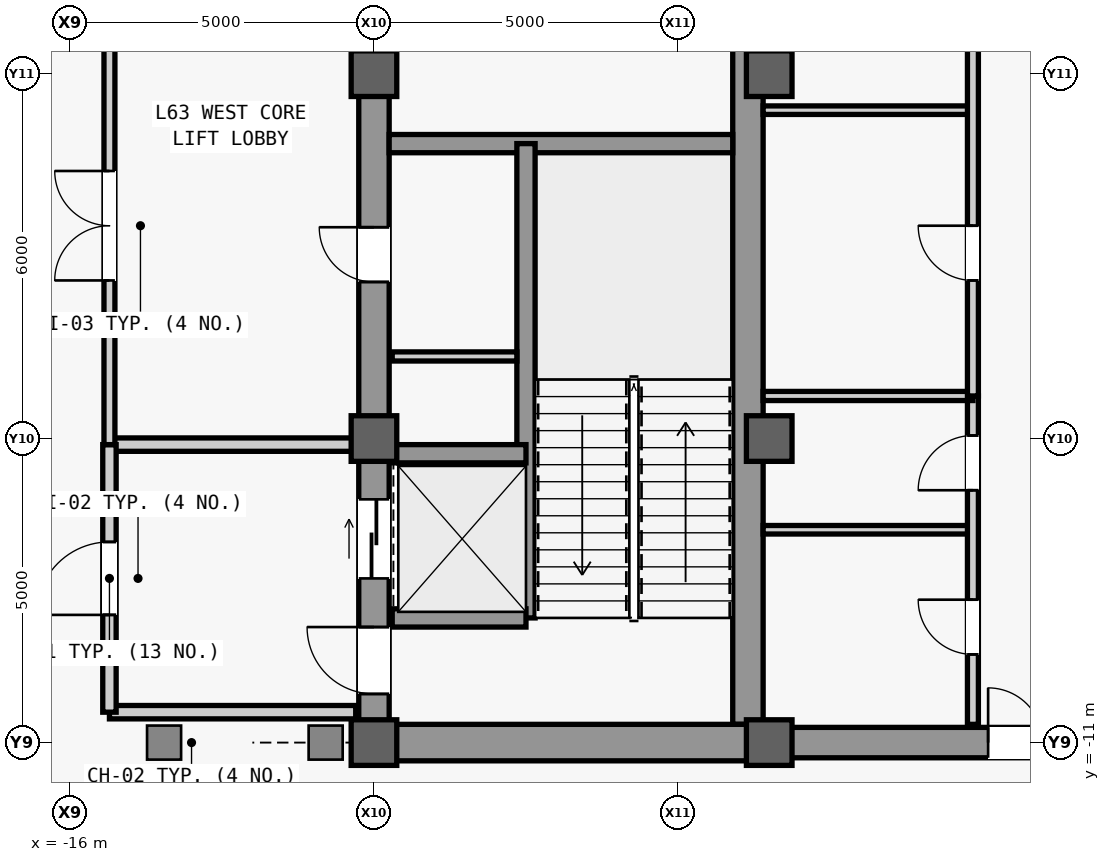
"""IFC4 building model, lengths in metres.
Left out: names, types, materials, properties, quantities, classifications, styles, units other than length and angle.
Written with IfcOpenShell. Run it as: python <this file> out.ifc"""

import sys

from ifc_helpers import new_model, si_unit, direction, frame, frame_2d, origin, origin_2d, place, context, subcontext, project, spatial, rectangle, extrude, source, transform, mapped, element, fill, save


model = new_model("IFC4")
c1 = context("Model", 3, precision=1e-05, world=origin(), true_north=direction((0.0, 1.0)))
c2 = subcontext(c1, "Body", "Model", "MODEL_VIEW")
j1 = project(units=[si_unit("LENGTHUNIT", "METRE"), si_unit("PLANEANGLEUNIT", "RADIAN")], contexts=[c1])
p1 = place(None, origin())
s1 = spatial("IfcSite", under=j1, at=p1, CompositionType="ELEMENT")
p2 = place(p1, origin())
s2 = spatial("IfcBuilding", under=s1, at=p2, CompositionType="ELEMENT")
p3 = place(p2, frame((0.0, 0.0, 268.3)))
s3 = spatial("IfcBuildingStorey", under=s2, at=p3, CompositionType="ELEMENT", Elevation=268.3)
m1 = source(origin(), c2, "Body", "SweptSolid", [
    extrude(rectangle(XDim=22.0, YDim=0.5, at=frame_2d((11.0, 0.0))), origin(), (0.0, 0.0, 1.0), 4.98),
])
p4 = place(p3, frame((-11.0, -11.0, 0.0), z_axis=(0.0, 0.0, 1.0), x_axis=(0.0, 1.0, 0.0)))
e1 = element("IfcWall", 1, at=p4, inside=s3, PredefinedType="SHEAR", context=c2, shape_type="MappedRepresentation", body=[
    mapped(m1, transform((0.0, 0.0, 0.0), scale=1.0)),
])
m2 = source(origin(), c2, "Body", "SweptSolid", [
    extrude(rectangle(XDim=1.1, YDim=2.2, at=frame_2d((0.55, 1.1))), frame((0.0, 0.26, 0.0), z_axis=(0.0, -1.0, 0.0), x_axis=(1.0, 0.0, 0.0)), (0.0, 0.0, 1.0), 0.52),
])
p5 = place(p4, frame((0.8, 0.0, 0.0)))
e2 = element("IfcOpeningElement", 2, at=p5, cuts=e1, PredefinedType="OPENING", context=c2, shape_type="MappedRepresentation", body=[
    mapped(m2, transform((0.0, 0.0, 0.0), scale=1.0)),
])
p6 = place(p4, frame((12.5, 0.0, 0.0)))
e3 = element("IfcOpeningElement", 3, at=p6, cuts=e1, PredefinedType="OPENING", context=c2, shape_type="MappedRepresentation", body=[
    mapped(m2, transform((0.0, 0.0, 0.0), scale=1.0)),
])
m3 = source(origin(), c2, "Body", "SweptSolid", [
    extrude(rectangle(XDim=0.9, YDim=2.15, at=frame_2d((0.45, 1.075))), frame((0.0, 0.26, 0.0), z_axis=(0.0, -1.0, 0.0), x_axis=(1.0, 0.0, 0.0)), (0.0, 0.0, 1.0), 0.52),
])
p7 = place(p4, frame((7.575, 0.0, 0.0)))
e4 = element("IfcOpeningElement", 4, at=p7, cuts=e1, PredefinedType="OPENING", context=c2, shape_type="MappedRepresentation", body=[
    mapped(m3, transform((0.0, 0.0, 0.0), scale=1.0)),
])
m4 = source(origin(), c2, "Body", "SweptSolid", [
    extrude(rectangle(XDim=1.3, YDim=2.3, at=frame_2d((0.65, 1.15))), frame((0.0, 0.26, 0.0), z_axis=(0.0, -1.0, 0.0), x_axis=(1.0, 0.0, 0.0)), (0.0, 0.0, 1.0), 0.52),
])
p8 = place(p4, frame((2.7, 0.0, 0.0)))
e5 = element("IfcOpeningElement", 5, at=p8, cuts=e1, PredefinedType="OPENING", context=c2, shape_type="MappedRepresentation", body=[
    mapped(m4, transform((0.0, 0.0, 0.0), scale=1.0)),
])
m5 = source(origin(), c2, "Body", "SweptSolid", [
    extrude(rectangle(XDim=21.4, YDim=0.5, at=frame_2d((10.7, 0.0))), origin(), (0.0, 0.0, 1.0), 4.98),
])
p9 = place(p3, frame((-4.85, -10.7, 0.0), z_axis=(0.0, 0.0, 1.0), x_axis=(0.0, 1.0, 0.0)))
e6 = element("IfcWall", 6, at=p9, inside=s3, PredefinedType="SHEAR", context=c2, shape_type="MappedRepresentation", body=[
    mapped(m5, transform((0.0, 0.0, 0.0), scale=1.0)),
])
m6 = source(origin(), c2, "Body", "SweptSolid", [
    extrude(rectangle(XDim=5.9, YDim=0.6, at=frame_2d((2.95, 0.0))), origin(), (0.0, 0.0, 1.0), 4.98),
])
p10 = place(p3, frame((-10.75, -11.0, 0.0), z_axis=(0.0, 0.0, 1.0), x_axis=(1.0, 0.0, 0.0)))
e7 = element("IfcWall", 7, at=p10, inside=s3, PredefinedType="SHEAR", context=c2, shape_type="MappedRepresentation", body=[
    mapped(m6, transform((0.0, 0.0, 0.0), scale=1.0)),
])
m7 = source(origin(), c2, "Body", "SweptSolid", [
    extrude(rectangle(XDim=5.65, YDim=0.3, at=frame_2d((2.825, 0.0))), origin(), (0.0, 0.0, 1.0), 4.98),
])
p11 = place(p3, frame((-10.75, -1.15, 0.0), z_axis=(0.0, 0.0, 1.0), x_axis=(1.0, 0.0, 0.0)))
e8 = element("IfcWall", 8, at=p11, inside=s3, PredefinedType="SHEAR", context=c2, shape_type="MappedRepresentation", body=[
    mapped(m7, transform((0.0, 0.0, 0.0), scale=1.0)),
])
m8 = source(origin(), c2, "Body", "SweptSolid", [
    extrude(rectangle(XDim=9.2, YDim=0.5, at=frame_2d((4.6, 0.0))), origin(), (0.0, 0.0, 1.0), 4.98),
])
p12 = place(p3, frame((-4.6, -11.0, 0.0), z_axis=(0.0, 0.0, 1.0), x_axis=(1.0, 0.0, 0.0)))
e9 = element("IfcWall", 9, at=p12, inside=s3, PredefinedType="SHEAR", context=c2, shape_type="MappedRepresentation", body=[
    mapped(m8, transform((0.0, 0.0, 0.0), scale=1.0)),
])
m9 = source(origin(), c2, "Body", "SweptSolid", [
    extrude(rectangle(XDim=1.8, YDim=2.25, at=frame_2d((0.9, 1.125))), frame((0.0, 0.26, 0.0), z_axis=(0.0, -1.0, 0.0), x_axis=(1.0, 0.0, 0.0)), (0.0, 0.0, 1.0), 0.52),
])
p13 = place(p12, frame((3.7, 0.0, 0.0)))
e10 = element("IfcOpeningElement", 10, at=p13, cuts=e9, PredefinedType="OPENING", context=c2, shape_type="MappedRepresentation", body=[
    mapped(m9, transform((0.0, 0.0, 0.0), scale=1.0)),
])
m10 = source(origin(), c2, "Body", "SweptSolid", [
    extrude(rectangle(XDim=0.75, YDim=0.75, at=origin_2d()), origin(), (0.0, 0.0, 1.0), 5.2),
])
for number, where, z_axis, x_axis in (
    (11, (-11.0, -11.0, 0.0), (0.0, 0.0, 1.0), (1.0, 0.0, 0.0)),
    (12, (-11.0, -6.0, 0.0), (0.0, 0.0, 1.0), (1.0, 0.0, 0.0)),
    (13, (-11.0, 0.0, 0.0), (0.0, 0.0, 1.0), (1.0, 0.0, 0.0)),
    (14, (-4.5, -11.0, 0.0), (0.0, 0.0, 1.0), (1.0, 0.0, 0.0)),
    (15, (-4.5, -6.0, 0.0), (0.0, 0.0, 1.0), (1.0, 0.0, 0.0)),
    (16, (-4.5, 0.0, 0.0), (0.0, 0.0, 1.0), (1.0, 0.0, 0.0)),
):
    element("IfcColumn", number, at=place(p3, frame(where, z_axis=z_axis, x_axis=x_axis)), inside=s3, PredefinedType="COLUMN", context=c2, shape_type="MappedRepresentation", body=[
        mapped(m10, transform((0.0, 0.0, 0.0), scale=1.0)),
    ])
m11 = source(origin(), c2, "Body", "SweptSolid", [
    extrude(rectangle(XDim=7.8, YDim=0.3, at=frame_2d((3.9, 0.0))), origin(), (0.0, 0.0, 1.0), 4.98),
])
p14 = place(p3, frame((-8.5, -8.95, 0.0), z_axis=(0.0, 0.0, 1.0), x_axis=(0.0, 1.0, 0.0)))
e17 = element("IfcWall", 17, at=p14, inside=s3, PredefinedType="SHEAR", context=c2, shape_type="MappedRepresentation", body=[
    mapped(m11, transform((0.0, 0.0, 0.0), scale=1.0)),
])
m12 = source(origin(), c2, "Body", "SweptSolid", [
    extrude(rectangle(XDim=2.2, YDim=0.3, at=frame_2d((1.1, 0.0))), origin(), (0.0, 0.0, 1.0), 4.98),
])
for number, where, z_axis, x_axis in (
    (18, (-10.7, -8.95, 0.0), (0.0, 0.0, 1.0), (1.0, 0.0, 0.0)),
    (19, (-10.7, -6.25, 0.0), (0.0, 0.0, 1.0), (1.0, 0.0, 0.0)),
):
    element("IfcWall", number, at=place(p3, frame(where, z_axis=z_axis, x_axis=x_axis)), inside=s3, PredefinedType="SHEAR", context=c2, shape_type="MappedRepresentation", body=[
        mapped(m12, transform((0.0, 0.0, 0.0), scale=1.0)),
    ])
m13 = source(origin(), c2, "Body", "SweptSolid", [
    extrude(rectangle(XDim=2.05, YDim=0.15, at=frame_2d((1.025, 0.0))), origin(), (0.0, 0.0, 1.0), 4.98),
])
p15 = place(p3, frame((-10.7, -4.65, 0.0), z_axis=(0.0, 0.0, 1.0), x_axis=(1.0, 0.0, 0.0)))
e20 = element("IfcWall", 20, at=p15, inside=s3, PredefinedType="PARTITIONING", context=c2, shape_type="MappedRepresentation", body=[
    mapped(m13, transform((0.0, 0.0, 0.0), scale=1.0)),
])
m14 = source(origin(), c2, "Body", "SweptSolid", [
    extrude(rectangle(XDim=4.05, YDim=0.22, at=frame_2d((2.025, 0.0))), origin(), (0.0, 0.0, 1.0), 4.98),
])
p16 = place(p3, frame((-15.35, -10.5, 0.0), z_axis=(0.0, 0.0, 1.0), x_axis=(1.0, 0.0, 0.0)))
e21 = element("IfcWall", 21, at=p16, inside=s3, PredefinedType="PARTITIONING", context=c2, shape_type="MappedRepresentation", body=[
    mapped(m14, transform((0.0, 0.0, 0.0), scale=1.0)),
])
m15 = source(origin(), c2, "Body", "SweptSolid", [
    extrude(rectangle(XDim=4.05, YDim=0.22, at=frame_2d((2.025, 0.0))), origin(), (0.0, 0.0, 1.0), 4.285),
])
p17 = place(p3, frame((-15.35, -6.1, 0.0), z_axis=(0.0, 0.0, 1.0), x_axis=(1.0, 0.0, 0.0)))
e22 = element("IfcWall", 22, at=p17, inside=s3, PredefinedType="PARTITIONING", context=c2, shape_type="MappedRepresentation", body=[
    mapped(m15, transform((0.0, 0.0, 0.0), scale=1.0)),
])
m16 = source(origin(), c2, "Body", "SweptSolid", [
    extrude(rectangle(XDim=4.4, YDim=0.22, at=frame_2d((2.2, 0.0))), origin(), (0.0, 0.0, 1.0), 4.98),
])
p18 = place(p3, frame((-15.35, -10.5, 0.0), z_axis=(0.0, 0.0, 1.0), x_axis=(0.0, 1.0, 0.0)))
e23 = element("IfcWall", 23, at=p18, inside=s3, PredefinedType="PARTITIONING", context=c2, shape_type="MappedRepresentation", body=[
    mapped(m16, transform((0.0, 0.0, 0.0), scale=1.0)),
])
m17 = source(origin(), c2, "Body", "SweptSolid", [
    extrude(rectangle(XDim=1.2, YDim=2.2, at=frame_2d((0.6, 1.1))), frame((0.0, 0.12, 0.0), z_axis=(0.0, -1.0, 0.0), x_axis=(1.0, 0.0, 0.0)), (0.0, 0.0, 1.0), 0.24),
])
p19 = place(p18, frame((1.6, 0.0, 0.0)))
e24 = element("IfcOpeningElement", 24, at=p19, cuts=e23, PredefinedType="OPENING", context=c2, shape_type="MappedRepresentation", body=[
    mapped(m17, transform((0.0, 0.0, 0.0), scale=1.0)),
])
m18 = source(origin(), c2, "Body", "SweptSolid", [
    extrude(rectangle(XDim=16.6, YDim=0.18, at=frame_2d((8.3, 0.0))), origin(), (0.0, 0.0, 1.0), 4.98),
])
p20 = place(p3, frame((-15.35, -6.1, 0.0), z_axis=(0.0, 0.0, 1.0), x_axis=(0.0, 1.0, 0.0)))
e25 = element("IfcWall", 25, at=p20, inside=s3, PredefinedType="PARTITIONING", context=c2, shape_type="MappedRepresentation", body=[
    mapped(m18, transform((0.0, 0.0, 0.0), scale=1.0)),
])
m19 = source(origin(), c2, "Body", "SweptSolid", [
    extrude(rectangle(XDim=1.8, YDim=2.25, at=frame_2d((0.9, 1.125))), frame((0.0, 0.1, 0.0), z_axis=(0.0, -1.0, 0.0), x_axis=(1.0, 0.0, 0.0)), (0.0, 0.0, 1.0), 0.2),
])
p21 = place(p20, frame((2.7, 0.0, 0.0)))
e26 = element("IfcOpeningElement", 26, at=p21, cuts=e25, PredefinedType="OPENING", context=c2, shape_type="MappedRepresentation", body=[
    mapped(m19, transform((0.0, 0.0, 0.0), scale=1.0)),
])
p22 = place(p20, frame((11.0, 0.0, 0.0)))
e27 = element("IfcOpeningElement", 27, at=p22, cuts=e25, PredefinedType="OPENING", context=c2, shape_type="MappedRepresentation", body=[
    mapped(m19, transform((0.0, 0.0, 0.0), scale=1.0)),
])
m20 = source(origin(), c2, "Body", "SweptSolid", [
    extrude(rectangle(XDim=3.45, YDim=0.14, at=frame_2d((1.725, 0.0))), origin(), (0.0, 0.0, 1.0), 4.98),
])
p23 = place(p3, frame((-4.6, -7.5, 0.0), z_axis=(0.0, 0.0, 1.0), x_axis=(1.0, 0.0, 0.0)))
e28 = element("IfcWall", 28, at=p23, inside=s3, PredefinedType="PARTITIONING", context=c2, shape_type="MappedRepresentation", body=[
    mapped(m20, transform((0.0, 0.0, 0.0), scale=1.0)),
])
m21 = source(origin(), c2, "Body", "SweptSolid", [
    extrude(rectangle(XDim=5.4, YDim=0.18, at=frame_2d((2.7, 0.0))), origin(), (0.0, 0.0, 1.0), 4.98),
])
p24 = place(p3, frame((-1.15, -10.7, 0.0), z_axis=(0.0, 0.0, 1.0), x_axis=(0.0, 1.0, 0.0)))
e29 = element("IfcWall", 29, at=p24, inside=s3, PredefinedType="PARTITIONING", context=c2, shape_type="MappedRepresentation", body=[
    mapped(m21, transform((0.0, 0.0, 0.0), scale=1.0)),
])
m22 = source(origin(), c2, "Body", "SweptSolid", [
    extrude(rectangle(XDim=0.9, YDim=2.15, at=frame_2d((0.45, 1.075))), frame((0.0, 0.1, 0.0), z_axis=(0.0, -1.0, 0.0), x_axis=(1.0, 0.0, 0.0)), (0.0, 0.0, 1.0), 0.2),
])
p25 = place(p24, frame((1.15, 0.0, 0.0)))
e30 = element("IfcOpeningElement", 30, at=p25, cuts=e29, PredefinedType="OPENING", context=c2, shape_type="MappedRepresentation", body=[
    mapped(m22, transform((0.0, 0.0, 0.0), scale=1.0)),
])
p26 = place(p24, frame((3.85, 0.0, 0.0)))
e31 = element("IfcOpeningElement", 31, at=p26, cuts=e29, PredefinedType="OPENING", context=c2, shape_type="MappedRepresentation", body=[
    mapped(m22, transform((0.0, 0.0, 0.0), scale=1.0)),
])
m23 = source(origin(), c2, "Body", "SweptSolid", [
    extrude(rectangle(XDim=3.45, YDim=0.15, at=frame_2d((1.725, 0.0))), origin(), (0.0, 0.0, 1.0), 4.98),
])
p27 = place(p3, frame((-4.6, -5.3, 0.0), z_axis=(0.0, 0.0, 1.0), x_axis=(1.0, 0.0, 0.0)))
e32 = element("IfcWall", 32, at=p27, inside=s3, PredefinedType="PARTITIONING", context=c2, shape_type="MappedRepresentation", body=[
    mapped(m23, transform((0.0, 0.0, 0.0), scale=1.0)),
])
p28 = place(p3, frame((-4.6, -0.6, 0.0), z_axis=(0.0, 0.0, 1.0), x_axis=(1.0, 0.0, 0.0)))
e33 = element("IfcWall", 33, at=p28, inside=s3, PredefinedType="PARTITIONING", context=c2, shape_type="MappedRepresentation", body=[
    mapped(m20, transform((0.0, 0.0, 0.0), scale=1.0)),
])
m24 = source(origin(), c2, "Body", "SweptSolid", [
    extrude(rectangle(XDim=10.6, YDim=0.18, at=frame_2d((5.3, 0.0))), origin(), (0.0, 0.0, 1.0), 4.98),
])
p29 = place(p3, frame((-1.15, -5.3, 0.0), z_axis=(0.0, 0.0, 1.0), x_axis=(0.0, 1.0, 0.0)))
e34 = element("IfcWall", 34, at=p29, inside=s3, PredefinedType="PARTITIONING", context=c2, shape_type="MappedRepresentation", body=[
    mapped(m24, transform((0.0, 0.0, 0.0), scale=1.0)),
])
p30 = place(p29, frame((1.9, 0.0, 0.0)))
e35 = element("IfcOpeningElement", 35, at=p30, cuts=e34, PredefinedType="OPENING", context=c2, shape_type="MappedRepresentation", body=[
    mapped(m22, transform((0.0, 0.0, 0.0), scale=1.0)),
])
p31 = place(p29, frame((6.55, 0.0, 0.0)))
e36 = element("IfcOpeningElement", 36, at=p31, cuts=e34, PredefinedType="OPENING", context=c2, shape_type="MappedRepresentation", body=[
    mapped(m22, transform((0.0, 0.0, 0.0), scale=1.0)),
])
p32 = place(p29, frame((9.475, 0.0, 0.0)))
e37 = element("IfcOpeningElement", 37, at=p32, cuts=e34, PredefinedType="OPENING", context=c2, shape_type="MappedRepresentation", body=[
    mapped(m22, transform((0.0, 0.0, 0.0), scale=1.0)),
])
m25 = source(origin(), c2, "Body", "SweptSolid", [
    extrude(rectangle(XDim=1.1, YDim=2.2, at=frame_2d((0.55, 1.1))), frame((0.0, 0.025, 0.0), z_axis=(0.0, -1.0, 0.0), x_axis=(1.0, 0.0, 0.0)), (0.0, 0.0, 1.0), 0.05),
])
p33 = place(p5, origin())
e38 = element("IfcDoor", 38, at=p33, inside=s3, OperationType="SINGLE_SWING_RIGHT", PredefinedType="DOOR", context=c2, shape_type="MappedRepresentation", body=[
    mapped(m25, transform((0.0, 0.0, 0.0), scale=1.0)),
])
fill(e2, e38)
m26 = source(origin(), c2, "Body", "SweptSolid", [
    extrude(rectangle(XDim=0.9, YDim=2.15, at=frame_2d((0.45, 1.075))), frame((0.0, 0.025, 0.0), z_axis=(0.0, -1.0, 0.0), x_axis=(1.0, 0.0, 0.0)), (0.0, 0.0, 1.0), 0.05),
])
p34 = place(p7, origin())
e39 = element("IfcDoor", 39, at=p34, inside=s3, OperationType="SINGLE_SWING_RIGHT", PredefinedType="DOOR", context=c2, shape_type="MappedRepresentation", body=[
    mapped(m26, transform((0.0, 0.0, 0.0), scale=1.0)),
])
fill(e4, e39)
m27 = source(origin(), c2, "Body", "SweptSolid", [
    extrude(rectangle(XDim=1.2, YDim=2.2, at=frame_2d((0.6, 1.1))), frame((0.0, 0.025, 0.0), z_axis=(0.0, -1.0, 0.0), x_axis=(1.0, 0.0, 0.0)), (0.0, 0.0, 1.0), 0.05),
])
p35 = place(p19, origin())
e40 = element("IfcDoor", 40, at=p35, inside=s3, OperationType="SINGLE_SWING_LEFT", PredefinedType="DOOR", context=c2, shape_type="MappedRepresentation", body=[
    mapped(m27, transform((0.0, 0.0, 0.0), scale=1.0)),
])
fill(e24, e40)
m28 = source(origin(), c2, "Body", "SweptSolid", [
    extrude(rectangle(XDim=1.8, YDim=2.25, at=frame_2d((0.9, 1.125))), frame((0.0, 0.025, 0.0), z_axis=(0.0, -1.0, 0.0), x_axis=(1.0, 0.0, 0.0)), (0.0, 0.0, 1.0), 0.05),
])
p36 = place(p21, origin())
e41 = element("IfcDoor", 41, at=p36, inside=s3, OperationType="SINGLE_SWING_LEFT", PredefinedType="DOOR", context=c2, shape_type="MappedRepresentation", body=[
    mapped(m28, transform((0.0, 0.0, 0.0), scale=1.0)),
])
fill(e26, e41)
p37 = place(p25, origin())
e42 = element("IfcDoor", 42, at=p37, inside=s3, OperationType="SINGLE_SWING_RIGHT", PredefinedType="DOOR", context=c2, shape_type="MappedRepresentation", body=[
    mapped(m26, transform((0.0, 0.0, 0.0), scale=1.0)),
])
fill(e30, e42)
p38 = place(p26, origin())
e43 = element("IfcDoor", 43, at=p38, inside=s3, OperationType="SINGLE_SWING_LEFT", PredefinedType="DOOR", context=c2, shape_type="MappedRepresentation", body=[
    mapped(m26, transform((0.0, 0.0, 0.0), scale=1.0)),
])
fill(e31, e43)
p39 = place(p13, origin())
e44 = element("IfcDoor", 44, at=p39, inside=s3, OperationType="SINGLE_SWING_LEFT", PredefinedType="DOOR", context=c2, shape_type="MappedRepresentation", body=[
    mapped(m28, transform((0.0, 0.0, 0.0), scale=1.0)),
])
fill(e10, e44)
p40 = place(p30, origin())
e45 = element("IfcDoor", 45, at=p40, inside=s3, OperationType="SINGLE_SWING_RIGHT", PredefinedType="DOOR", context=c2, shape_type="MappedRepresentation", body=[
    mapped(m26, transform((0.0, 0.0, 0.0), scale=1.0)),
])
fill(e35, e45)
m29 = source(origin(), c2, "Body", "SweptSolid", [
    extrude(rectangle(XDim=1.3, YDim=2.3, at=frame_2d((0.65, 1.15))), frame((0.0, 0.025, 0.0), z_axis=(0.0, -1.0, 0.0), x_axis=(1.0, 0.0, 0.0)), (0.0, 0.0, 1.0), 0.05),
])
p41 = place(p8, origin())
e46 = element("IfcDoor", 46, at=p41, inside=s3, OperationType="SLIDING_TO_LEFT", PredefinedType="DOOR", context=c2, shape_type="MappedRepresentation", body=[
    mapped(m29, transform((0.0, 0.0, 0.0), scale=1.0)),
])
fill(e5, e46)
save(model, sys.argv[1])
